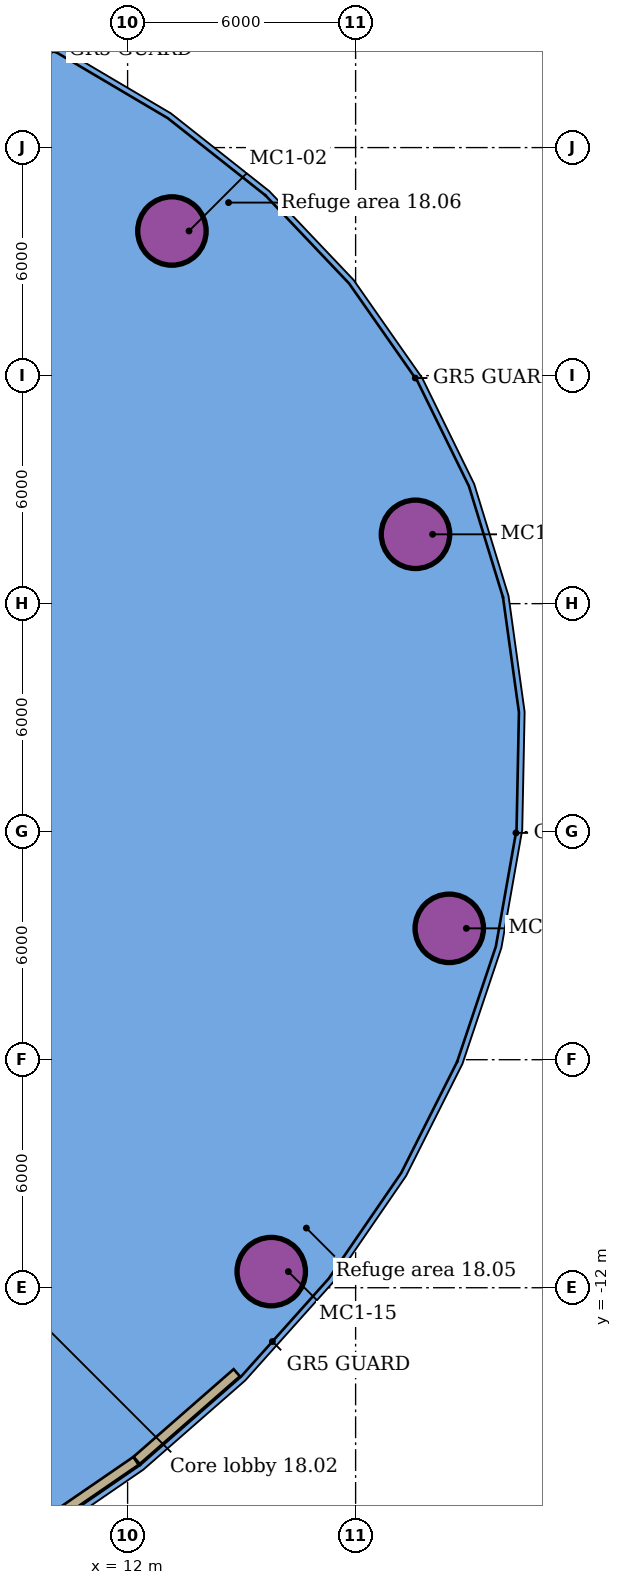
"""IFC4 building model, lengths in metres.
Left out: names, types, materials, properties, quantities, classifications, styles, units other than length and angle.
Written with IfcOpenShell. Run it as: python <this file> out.ifc"""

import sys

from ifc_helpers import new_model, si_unit, direction, frame, frame_2d, origin, origin_2d, place, context, subcontext, project, spatial, rectangle, hollow_circle, extrude, element, save


model = new_model("IFC4")
c1 = context("Model", 3, precision=1e-05, world=origin(), true_north=direction((0.0, 1.0)))
c2 = subcontext(c1, "Body", "Model", "MODEL_VIEW")
j1 = project(units=[si_unit("LENGTHUNIT", "METRE"), si_unit("PLANEANGLEUNIT", "RADIAN")], contexts=[c1])
p1 = place(None, origin())
s1 = spatial("IfcSite", under=j1, at=p1, CompositionType="ELEMENT")
p2 = place(p1, origin())
s2 = spatial("IfcBuilding", under=s1, at=p2, CompositionType="ELEMENT")
p3 = place(p2, frame((0.0, 0.0, 84.1)))
s3 = spatial("IfcBuildingStorey", under=s2, at=p3, CompositionType="ELEMENT", Elevation=84.1)
for number, where, z_axis, x_axis in (
    (1, (19.575, 7.824, 0.0), (0.0, 0.0, 1.0), (1.0, 0.0, 0.0)),
    (2, (13.166, 15.805, 0.0), (0.0, 0.0, 1.0), (1.0, 0.0, 0.0)),
    (3, (15.78, -11.576, 0.0), (0.0, 0.0, 1.0), (1.0, 0.0, 0.0)),
    (4, (20.464, -2.543, 0.0), (0.0, 0.0, 1.0), (1.0, 0.0, 0.0)),
):
    element("IfcColumn", number, at=place(p3, frame(where, z_axis=z_axis, x_axis=x_axis)), inside=s3, PredefinedType="COLUMN", context=c2, shape_type="SweptSolid", body=[
        extrude(hollow_circle(Radius=0.9, WallThickness=0.06, at=origin_2d()), origin(), (0.0, 0.0, 1.0), 4.35),
    ])
p4 = place(p3, frame((9.273, -18.58, 0.0), z_axis=(0.0, 0.0, 1.0), x_axis=(0.824269010653, 0.566198373432, 0.0)))
e5 = element("IfcWall", 5, at=p4, inside=s3, PredefinedType="SOLIDWALL", context=c2, shape_type="SweptSolid", body=[
    extrude(rectangle(XDim=3.575, YDim=0.25, at=frame_2d((1.788, 0.0))), origin(), (0.0, 0.0, 1.0), 3.95),
])
p5 = place(p3, frame((12.238, -16.542, 0.0), z_axis=(0.0, 0.0, 1.0), x_axis=(0.752650141407, 0.658420659335, 0.0)))
e6 = element("IfcWall", 6, at=p5, inside=s3, PredefinedType="SOLIDWALL", context=c2, shape_type="SweptSolid", body=[
    extrude(rectangle(XDim=3.5, YDim=0.25, at=frame_2d((1.75, 0.0))), origin(), (0.0, 0.0, 1.0), 3.95),
])
save(model, sys.argv[1])
